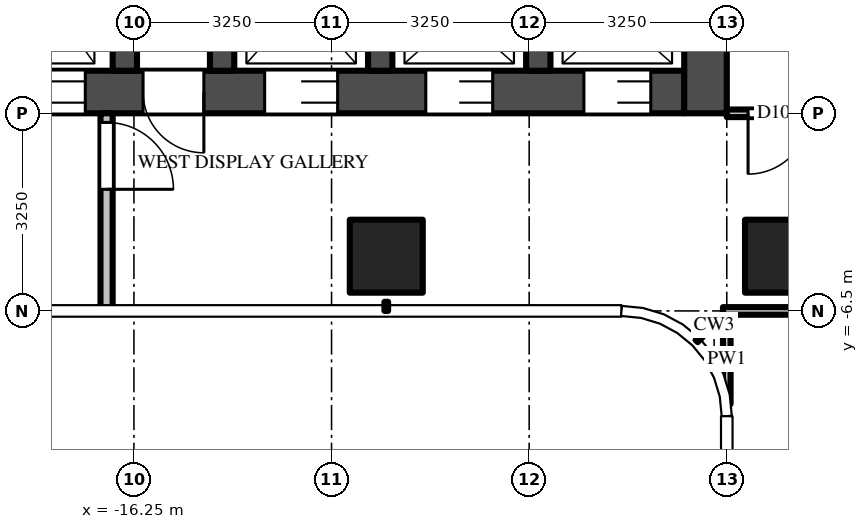
"""IFC4 building model, lengths in metres.
Left out: names, types, materials, properties, quantities, classifications, styles, units other than length and angle.
Written with IfcOpenShell. Run it as: python <this file> out.ifc"""

import sys

from ifc_helpers import new_model, si_unit, direction, frame, frame_2d, origin, origin_2d, place, context, subcontext, project, spatial, rectangle, extrude, source, transform, mapped, element, fill, save


model = new_model("IFC4")
c1 = context("Model", 3, precision=1e-05, world=origin(), true_north=direction((0.0, 1.0)))
c2 = subcontext(c1, "Body", "Model", "MODEL_VIEW")
j1 = project(units=[si_unit("LENGTHUNIT", "METRE"), si_unit("PLANEANGLEUNIT", "RADIAN")], contexts=[c1])
p1 = place(None, origin())
s1 = spatial("IfcSite", under=j1, at=p1, CompositionType="ELEMENT")
p2 = place(p1, origin())
s2 = spatial("IfcBuilding", under=s1, at=p2, CompositionType="ELEMENT")
p3 = place(p2, frame((0.0, 0.0, 169.8)))
s3 = spatial("IfcBuildingStorey", under=s2, at=p3, CompositionType="ELEMENT", Elevation=169.8)
m1 = source(origin(), c2, "Body", "SweptSolid", [
    extrude(rectangle(XDim=1.2, YDim=1.2, at=origin_2d()), origin(), (0.0, 0.0, 1.0), 3.9),
])
for number, where, z_axis, x_axis in (
    (1, (-5.6, -5.6, 0.0), (0.0, 0.0, 1.0), (1.0, 0.0, 0.0)),
    (2, (-12.1, -5.6, 0.0), (0.0, 0.0, 1.0), (1.0, 0.0, 0.0)),
):
    element("IfcColumn", number, at=place(p3, frame(where, z_axis=z_axis, x_axis=x_axis)), inside=s3, PredefinedType="COLUMN", context=c2, shape_type="MappedRepresentation", body=[
        mapped(m1, transform((0.0, 0.0, 0.0))),
    ])
m2 = source(origin(), c2, "Body", "SweptSolid", [
    extrude(rectangle(XDim=14.85, YDim=0.7, at=frame_2d((7.425, 0.0))), origin(), (0.0, 0.0, 1.0), 3.7),
])
p4 = place(p3, frame((-7.2, -2.9, 0.0), z_axis=(0.0, 0.0, 1.0), x_axis=(-1.0, 0.0, 0.0)))
e3 = element("IfcWall", 3, at=p4, inside=s3, PredefinedType="SHEAR", context=c2, shape_type="MappedRepresentation", body=[
    mapped(m2, transform((0.0, 0.0, 0.0))),
])
m3 = source(origin(), c2, "Body", "SweptSolid", [
    extrude(rectangle(XDim=1.1, YDim=2.1, at=frame_2d((0.55, 1.05))), frame((0.0, 0.36, 0.0), z_axis=(0.0, -1.0, 0.0), x_axis=(1.0, 0.0, 0.0)), (0.0, 0.0, 1.0), 0.72),
])
p5 = place(p4, frame((0.55, 0.0, 0.0)))
e4 = element("IfcOpeningElement", 4, at=p5, cuts=e3, PredefinedType="OPENING", context=c2, shape_type="MappedRepresentation", body=[
    mapped(m3, transform((0.0, 0.0, 0.0))),
])
p6 = place(p4, frame((3.15, 0.0, 0.0)))
e5 = element("IfcOpeningElement", 5, at=p6, cuts=e3, PredefinedType="OPENING", context=c2, shape_type="MappedRepresentation", body=[
    mapped(m3, transform((0.0, 0.0, 0.0))),
])
m4 = source(origin(), c2, "Body", "SweptSolid", [
    extrude(rectangle(XDim=1.2, YDim=2.1, at=frame_2d((0.6, 1.05))), frame((0.0, 0.36, 0.0), z_axis=(0.0, -1.0, 0.0), x_axis=(1.0, 0.0, 0.0)), (0.0, 0.0, 1.0), 0.72),
])
p7 = place(p4, frame((5.7, 0.0, 0.0)))
e6 = element("IfcOpeningElement", 6, at=p7, cuts=e3, PredefinedType="OPENING", context=c2, shape_type="MappedRepresentation", body=[
    mapped(m4, transform((0.0, 0.0, 0.0))),
])
m5 = source(origin(), c2, "Body", "SweptSolid", [
    extrude(rectangle(XDim=1.3, YDim=2.1, at=frame_2d((0.65, 1.05))), frame((0.0, 0.36, 0.0), z_axis=(0.0, -1.0, 0.0), x_axis=(1.0, 0.0, 0.0)), (0.0, 0.0, 1.0), 0.72),
])
p8 = place(p4, frame((12.2, 0.0, 0.0)))
e7 = element("IfcOpeningElement", 7, at=p8, cuts=e3, PredefinedType="OPENING", context=c2, shape_type="MappedRepresentation", body=[
    mapped(m5, transform((0.0, 0.0, 0.0))),
])
p9 = place(p4, frame((9.85, 0.0, 0.0)))
e8 = element("IfcOpeningElement", 8, at=p9, cuts=e3, PredefinedType="OPENING", context=c2, shape_type="MappedRepresentation", body=[
    mapped(m4, transform((0.0, 0.0, 0.0))),
])
m6 = source(origin(), c2, "Body", "SweptSolid", [
    extrude(rectangle(XDim=1.0, YDim=2.1, at=frame_2d((0.5, 1.05))), frame((0.0, 0.36, 0.0), z_axis=(0.0, -1.0, 0.0), x_axis=(1.0, 0.0, 0.0)), (0.0, 0.0, 1.0), 0.72),
])
p10 = place(p4, frame((7.9, 0.0, 0.0)))
e9 = element("IfcOpeningElement", 9, at=p10, cuts=e3, PredefinedType="OPENING", context=c2, shape_type="MappedRepresentation", body=[
    mapped(m6, transform((0.0, 0.0, 0.0))),
])
m7 = source(origin(), c2, "Body", "SweptSolid", [
    extrude(rectangle(XDim=9.05, YDim=0.7, at=frame_2d((4.525, 0.0))), origin(), (0.0, 0.0, 1.0), 3.7),
])
p11 = place(p3, frame((-6.85, 5.8, 0.0), z_axis=(0.0, 0.0, 1.0), x_axis=(0.0, -1.0, 0.0)))
e10 = element("IfcWall", 10, at=p11, inside=s3, PredefinedType="SHEAR", context=c2, shape_type="MappedRepresentation", body=[
    mapped(m7, transform((0.0, 0.0, 0.0))),
])
m8 = source(origin(), c2, "Body", "SweptSolid", [
    extrude(rectangle(XDim=1.8, YDim=2.1, at=frame_2d((0.9, 1.05))), frame((0.0, 0.36, 0.0), z_axis=(0.0, -1.0, 0.0), x_axis=(1.0, 0.0, 0.0)), (0.0, 0.0, 1.0), 0.72),
])
p12 = place(p11, frame((3.15, 0.0, 0.0)))
e11 = element("IfcOpeningElement", 11, at=p12, cuts=e10, PredefinedType="OPENING", context=c2, shape_type="MappedRepresentation", body=[
    mapped(m8, transform((0.0, 0.0, 0.0))),
])
m9 = source(origin(), c2, "Body", "SweptSolid", [
    extrude(rectangle(XDim=2.45, YDim=0.4, at=frame_2d((1.225, 0.0))), origin(), (0.0, 0.0, 1.0), 3.7),
])
for number, where, z_axis, x_axis in (
    (12, (-9.6, -0.1, 0.0), (0.0, 0.0, 1.0), (0.0, -1.0, 0.0)),
    (13, (-12.2, -0.1, 0.0), (0.0, 0.0, 1.0), (0.0, -1.0, 0.0)),
    (14, (-14.8, -0.1, 0.0), (0.0, 0.0, 1.0), (0.0, -1.0, 0.0)),
    (15, (-16.4, -0.1, 0.0), (0.0, 0.0, 1.0), (0.0, -1.0, 0.0)),
):
    element("IfcWall", number, at=place(p3, frame(where, z_axis=z_axis, x_axis=x_axis)), inside=s3, PredefinedType="SHEAR", context=c2, shape_type="MappedRepresentation", body=[
        mapped(m9, transform((0.0, 0.0, 0.0))),
    ])
m10 = source(origin(), c2, "Body", "SweptSolid", [
    extrude(rectangle(XDim=3.25, YDim=0.2, at=frame_2d((1.625, 0.0))), origin(), (0.0, 0.0, 1.0), 3.7),
])
p13 = place(p3, frame((-16.7, -3.25, 0.0), z_axis=(0.0, 0.0, 1.0), x_axis=(0.0, -1.0, 0.0)))
e16 = element("IfcWall", 16, at=p13, inside=s3, PredefinedType="PARTITIONING", context=c2, shape_type="MappedRepresentation", body=[
    mapped(m10, transform((0.0, 0.0, 0.0))),
])
m11 = source(origin(), c2, "Body", "SweptSolid", [
    extrude(rectangle(XDim=1.1, YDim=2.1, at=frame_2d((0.55, 1.05))), frame((0.0, 0.11, 0.0), z_axis=(0.0, -1.0, 0.0), x_axis=(1.0, 0.0, 0.0)), (0.0, 0.0, 1.0), 0.22),
])
p14 = place(p13, frame((0.15, 0.0, 0.0)))
e17 = element("IfcOpeningElement", 17, at=p14, cuts=e16, PredefinedType="OPENING", context=c2, shape_type="MappedRepresentation", body=[
    mapped(m11, transform((0.0, 0.0, 0.0))),
])
m12 = source(origin(), c2, "Body", "SweptSolid", [
    extrude(rectangle(XDim=1.469, YDim=0.125, at=frame_2d((0.734, 0.0))), origin(), (0.0, 0.0, 1.0), 3.7),
])
p15 = place(p3, frame((-6.5, -6.562, 0.0), z_axis=(0.0, 0.0, 1.0), x_axis=(0.0, -1.0, 0.0)))
e18 = element("IfcWall", 18, at=p15, inside=s3, PredefinedType="PARTITIONING", context=c2, shape_type="MappedRepresentation", body=[
    mapped(m12, transform((0.0, 0.0, 0.0))),
])
m13 = source(origin(), c2, "Body", "SweptSolid", [
    extrude(rectangle(XDim=3.725, YDim=0.125, at=frame_2d((1.863, 0.0))), origin(), (0.0, 0.0, 1.0), 2.78),
])
p16 = place(p3, frame((-2.837, -6.5, 0.0), z_axis=(0.0, 0.0, 1.0), x_axis=(-1.0, 0.0, 0.0)))
e19 = element("IfcWall", 19, at=p16, inside=s3, PredefinedType="PARTITIONING", context=c2, shape_type="MappedRepresentation", body=[
    mapped(m13, transform((0.0, 0.0, 0.0))),
])
m14 = source(origin(), c2, "Body", "SweptSolid", [
    extrude(rectangle(XDim=5.363, YDim=0.125, at=frame_2d((2.681, 0.0))), origin(), (0.0, 0.0, 1.0), 2.996),
])
p17 = place(p3, frame((-1.137, -3.25, 0.0), z_axis=(0.0, 0.0, 1.0), x_axis=(-1.0, 0.0, 0.0)))
e20 = element("IfcWall", 20, at=p17, inside=s3, PredefinedType="PARTITIONING", context=c2, shape_type="MappedRepresentation", body=[
    mapped(m14, transform((0.0, 0.0, 0.0))),
])
m15 = source(origin(), c2, "Body", "SweptSolid", [
    extrude(rectangle(XDim=1.0, YDim=2.1, at=frame_2d((0.5, 1.05))), frame((0.0, 0.073, 0.0), z_axis=(0.0, -1.0, 0.0), x_axis=(1.0, 0.0, 0.0)), (0.0, 0.0, 1.0), 0.145),
])
p18 = place(p17, frame((4.012, 0.0, 0.0)))
e21 = element("IfcOpeningElement", 21, at=p18, cuts=e20, PredefinedType="OPENING", context=c2, shape_type="MappedRepresentation", body=[
    mapped(m15, transform((0.0, 0.0, 0.0))),
])
m16 = source(origin(), c2, "Body", "SweptSolid", [
    extrude(rectangle(XDim=1.1, YDim=2.1, at=frame_2d((0.55, 1.05))), frame((0.0, -0.275, 0.0), z_axis=(0.0, -1.0, 0.0), x_axis=(1.0, 0.0, 0.0)), (0.0, 0.0, 1.0), 0.05),
])
p19 = place(p5, origin())
e22 = element("IfcDoor", 22, at=p19, inside=s3, OperationType="DOUBLE_DOOR_SLIDING", PredefinedType="DOOR", context=c2, shape_type="MappedRepresentation", body=[
    mapped(m16, transform((0.0, 0.0, 0.0))),
])
fill(e4, e22)
p20 = place(p6, origin())
e23 = element("IfcDoor", 23, at=p20, inside=s3, OperationType="DOUBLE_DOOR_SLIDING", PredefinedType="DOOR", context=c2, shape_type="MappedRepresentation", body=[
    mapped(m16, transform((0.0, 0.0, 0.0))),
])
fill(e5, e23)
m17 = source(origin(), c2, "Body", "SweptSolid", [
    extrude(rectangle(XDim=1.2, YDim=2.1, at=frame_2d((0.6, 1.05))), frame((0.0, -0.275, 0.0), z_axis=(0.0, -1.0, 0.0), x_axis=(1.0, 0.0, 0.0)), (0.0, 0.0, 1.0), 0.05),
])
p21 = place(p7, origin())
e24 = element("IfcDoor", 24, at=p21, inside=s3, OperationType="DOUBLE_DOOR_SLIDING", PredefinedType="DOOR", context=c2, shape_type="MappedRepresentation", body=[
    mapped(m17, transform((0.0, 0.0, 0.0))),
])
fill(e6, e24)
p22 = place(p9, origin())
e25 = element("IfcDoor", 25, at=p22, inside=s3, OperationType="DOUBLE_DOOR_SLIDING", PredefinedType="DOOR", context=c2, shape_type="MappedRepresentation", body=[
    mapped(m17, transform((0.0, 0.0, 0.0))),
])
fill(e8, e25)
m18 = source(origin(), c2, "Body", "SweptSolid", [
    extrude(rectangle(XDim=1.0, YDim=2.1, at=frame_2d((0.5, 1.05))), frame((0.0, -0.275, 0.0), z_axis=(0.0, -1.0, 0.0), x_axis=(1.0, 0.0, 0.0)), (0.0, 0.0, 1.0), 0.05),
])
p23 = place(p10, origin())
e26 = element("IfcDoor", 26, at=p23, inside=s3, OperationType="SINGLE_SWING_LEFT", PredefinedType="DOOR", context=c2, shape_type="MappedRepresentation", body=[
    mapped(m18, transform((0.0, 0.0, 0.0))),
])
fill(e9, e26)
m19 = source(origin(), c2, "Body", "SweptSolid", [
    extrude(rectangle(XDim=1.1, YDim=2.1, at=frame_2d((0.55, 1.05))), frame((0.0, 0.025, 0.0), z_axis=(0.0, -1.0, 0.0), x_axis=(1.0, 0.0, 0.0)), (0.0, 0.0, 1.0), 0.05),
])
p24 = place(p14, origin())
e27 = element("IfcDoor", 27, at=p24, inside=s3, OperationType="SINGLE_SWING_RIGHT", PredefinedType="DOOR", context=c2, shape_type="MappedRepresentation", body=[
    mapped(m19, transform((0.0, 0.0, 0.0))),
])
fill(e17, e27)
m20 = source(origin(), c2, "Body", "SweptSolid", [
    extrude(rectangle(XDim=1.0, YDim=2.1, at=frame_2d((0.5, 1.05))), frame((0.0, 0.025, 0.0), z_axis=(0.0, -1.0, 0.0), x_axis=(1.0, 0.0, 0.0)), (0.0, 0.0, 1.0), 0.05),
])
p25 = place(p18, origin())
e28 = element("IfcDoor", 28, at=p25, inside=s3, OperationType="SINGLE_SWING_RIGHT", PredefinedType="DOOR", context=c2, shape_type="MappedRepresentation", body=[
    mapped(m20, transform((0.0, 0.0, 0.0))),
])
fill(e21, e28)
save(model, sys.argv[1])
